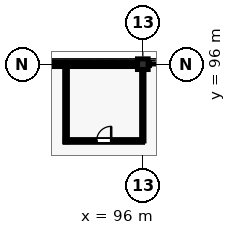
"""IFC4 building model, lengths in metres.
Left out: names, types, materials, properties, quantities, classifications, styles, units other than length and angle.
Written with IfcOpenShell. Run it as: python <this file> out.ifc"""

import sys

from ifc_helpers import new_model, si_unit, direction, frame, frame_2d, origin, origin_2d, place, context, subcontext, project, spatial, rectangle, extrude, element, fill, save


model = new_model("IFC4")
c1 = context("Model", 3, precision=1e-05, world=origin(), true_north=direction((0.0, 1.0)))
c2 = subcontext(c1, "Body", "Model", "MODEL_VIEW")
j1 = project(units=[si_unit("LENGTHUNIT", "METRE"), si_unit("PLANEANGLEUNIT", "RADIAN")], contexts=[c1])
p1 = place(None, origin())
s1 = spatial("IfcSite", under=j1, at=p1, CompositionType="ELEMENT")
p2 = place(p1, origin())
s2 = spatial("IfcBuilding", under=s1, at=p2, CompositionType="ELEMENT")
p3 = place(p2, origin())
s3 = spatial("IfcBuildingStorey", under=s2, at=p3, CompositionType="ELEMENT", Elevation=0.0)
p4 = place(p3, frame((96.0, 96.0, 0.0), z_axis=(0.0, 0.0, 1.0), x_axis=(1.0, 0.0, 0.0)))
e1 = element("IfcColumn", 1, at=p4, inside=s3, PredefinedType="COLUMN", context=c2, shape_type="SweptSolid", body=[
    extrude(rectangle(XDim=0.7, YDim=0.7, at=origin_2d()), origin(), (0.0, 0.0, 1.0), 5.28),
])
p5 = place(p3, frame((88.335, 96.0, 0.0), z_axis=(0.0, 0.0, 1.0), x_axis=(1.0, 0.0, 0.0)))
e2 = element("IfcWall", 2, at=p5, inside=s3, PredefinedType="SOLIDWALL", context=c2, shape_type="SweptSolid", body=[
    extrude(rectangle(XDim=7.33, YDim=0.305, at=frame_2d((3.665, 0.0))), origin(), (0.0, 0.0, 1.0), 4.677),
])
p6 = place(p5, frame((0.744, 0.0, 0.95)))
e3 = element("IfcOpeningElement", 3, at=p6, cuts=e2, PredefinedType="OPENING", context=c2, shape_type="SweptSolid", body=[
    extrude(rectangle(XDim=1.15, YDim=1.65, at=frame_2d((0.575, 0.825))), frame((0.0, 0.162, 0.0), z_axis=(0.0, -1.0, 0.0), x_axis=(1.0, 0.0, 0.0)), (0.0, 0.0, 1.0), 0.325),
])
p7 = place(p5, frame((5.436, 0.0, 0.95)))
e4 = element("IfcOpeningElement", 4, at=p7, cuts=e2, PredefinedType="OPENING", context=c2, shape_type="SweptSolid", body=[
    extrude(rectangle(XDim=1.15, YDim=1.65, at=frame_2d((0.575, 0.825))), frame((0.0, 0.162, 0.0), z_axis=(0.0, -1.0, 0.0), x_axis=(1.0, 0.0, 0.0)), (0.0, 0.0, 1.0), 0.325),
])
p8 = place(p3, frame((90.9, 90.95, 0.0), z_axis=(0.0, 0.0, 1.0), x_axis=(1.0, 0.0, 0.0)))
e5 = element("IfcWall", 5, at=p8, inside=s3, PredefinedType="PARTITIONING", context=c2, shape_type="SweptSolid", body=[
    extrude(rectangle(XDim=5.08, YDim=0.175, at=frame_2d((2.54, 0.0))), origin(), (0.0, 0.0, 1.0), 4.471),
])
p9 = place(p8, frame((2.06, 0.0, 0.0)))
e6 = element("IfcOpeningElement", 6, at=p9, cuts=e5, PredefinedType="OPENING", context=c2, shape_type="SweptSolid", body=[
    extrude(rectangle(XDim=0.96, YDim=2.14, at=frame_2d((0.48, 1.07))), frame((0.0, 0.097, 0.0), z_axis=(0.0, -1.0, 0.0), x_axis=(1.0, 0.0, 0.0)), (0.0, 0.0, 1.0), 0.195),
])
p10 = place(p3, frame((90.95, 90.9, 0.0), z_axis=(0.0, 0.0, 1.0), x_axis=(0.0, 1.0, 0.0)))
e7 = element("IfcWall", 7, at=p10, inside=s3, PredefinedType="PARTITIONING", context=c2, shape_type="SweptSolid", body=[
    extrude(rectangle(XDim=5.08, YDim=0.175, at=frame_2d((2.54, 0.0))), origin(), (0.0, 0.0, 1.0), 4.613),
])
p11 = place(p3, frame((96.0, 90.95, 0.0), z_axis=(0.0, 0.0, 1.0), x_axis=(0.0, 1.0, 0.0)))
e8 = element("IfcWall", 8, at=p11, inside=s3, PredefinedType="PARTITIONING", context=c2, shape_type="SweptSolid", body=[
    extrude(rectangle(XDim=4.69, YDim=0.15, at=frame_2d((2.345, 0.0))), origin(), (0.0, 0.0, 1.0), 4.471),
])
p12 = place(p6, origin())
e9 = element("IfcWindow", 9, at=p12, inside=s3, PartitioningType="SINGLE_PANEL", PredefinedType="WINDOW", context=c2, shape_type="SweptSolid", body=[
    extrude(rectangle(XDim=1.15, YDim=1.65, at=frame_2d((0.575, 0.825))), frame((0.0, 0.03, 0.0), z_axis=(0.0, -1.0, 0.0), x_axis=(1.0, 0.0, 0.0)), (0.0, 0.0, 1.0), 0.06),
])
fill(e3, e9)
p13 = place(p7, origin())
e10 = element("IfcWindow", 10, at=p13, inside=s3, PartitioningType="SINGLE_PANEL", PredefinedType="WINDOW", context=c2, shape_type="SweptSolid", body=[
    extrude(rectangle(XDim=1.15, YDim=1.65, at=frame_2d((0.575, 0.825))), frame((0.0, 0.03, 0.0), z_axis=(0.0, -1.0, 0.0), x_axis=(1.0, 0.0, 0.0)), (0.0, 0.0, 1.0), 0.06),
])
fill(e4, e10)
p14 = place(p9, origin())
e11 = element("IfcDoor", 11, at=p14, inside=s3, OperationType="SINGLE_SWING_RIGHT", PredefinedType="DOOR", context=c2, shape_type="SweptSolid", body=[
    extrude(rectangle(XDim=0.96, YDim=2.14, at=frame_2d((0.48, 1.07))), frame((0.0, 0.025, 0.0), z_axis=(0.0, -1.0, 0.0), x_axis=(1.0, 0.0, 0.0)), (0.0, 0.0, 1.0), 0.05),
])
fill(e6, e11)
save(model, sys.argv[1])
